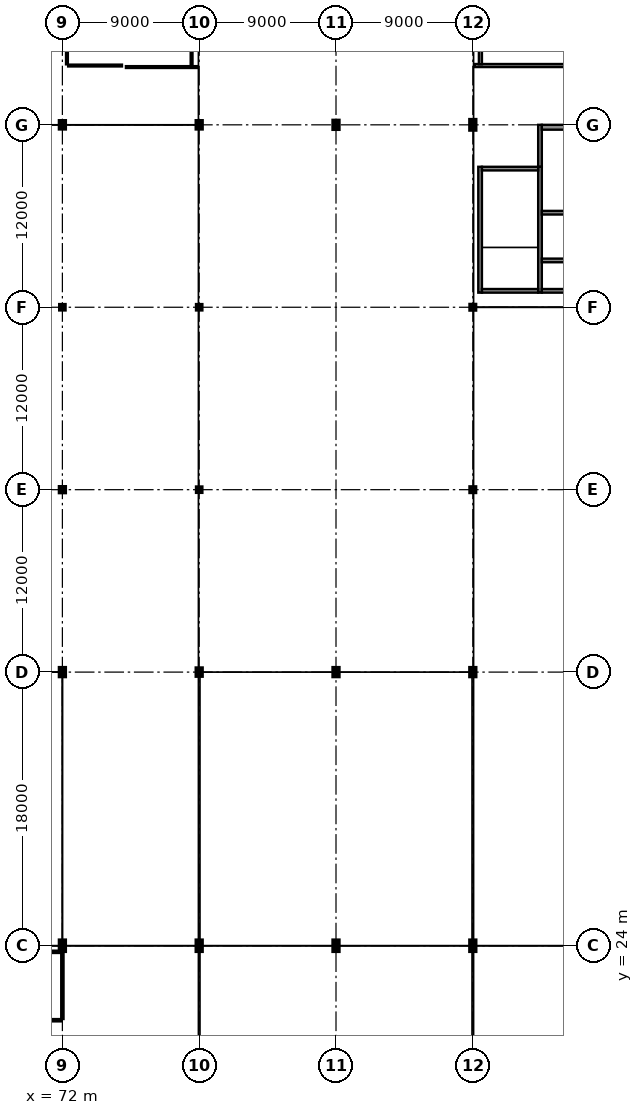
"""IFC4 building model, lengths in metres.
Left out: names, types, materials, properties, quantities, classifications, styles, units other than length and angle.
Written with IfcOpenShell. Run it as: python <this file> out.ifc"""

import sys

from ifc_helpers import new_model, si_unit, direction, frame, frame_2d, origin, origin_2d, place, context, subcontext, project, spatial, rectangle, i_section, extrude, element, fill, save


model = new_model("IFC4")
c1 = context("Model", 3, precision=1e-05, world=origin(), true_north=direction((0.0, 1.0)))
c2 = subcontext(c1, "Body", "Model", "MODEL_VIEW")
j1 = project(units=[si_unit("LENGTHUNIT", "METRE"), si_unit("PLANEANGLEUNIT", "RADIAN")], contexts=[c1])
p1 = place(None, origin())
s1 = spatial("IfcSite", under=j1, at=p1, CompositionType="ELEMENT")
p2 = place(p1, origin())
s2 = spatial("IfcBuilding", under=s1, at=p2, CompositionType="ELEMENT")
p3 = place(p2, frame((0.0, 0.0, 9.9)))
s3 = spatial("IfcBuildingStorey", under=s2, at=p3, CompositionType="ELEMENT", Elevation=9.9)
p4 = place(p3, frame((72.0, 24.0, 0.0), z_axis=(0.0, 0.0, 1.0), x_axis=(1.0, 0.0, 0.0)))
e1 = element("IfcColumn", 1, at=p4, inside=s3, PredefinedType="COLUMN", context=c2, shape_type="SweptSolid", body=[
    extrude(i_section(OverallWidth=0.3, OverallDepth=0.65, WebThickness=0.016, FlangeThickness=0.031, at=origin_2d()), origin(), (0.0, 0.0, 1.0), 4.5),
])
p5 = place(p3, frame((72.0, 42.0, 0.0), z_axis=(0.0, 0.0, 1.0), x_axis=(0.0, 1.0, 0.0)))
e2 = element("IfcColumn", 2, at=p5, inside=s3, PredefinedType="COLUMN", context=c2, shape_type="SweptSolid", body=[
    extrude(i_section(OverallWidth=0.3, OverallDepth=0.5, WebThickness=0.014, FlangeThickness=0.028, at=origin_2d()), origin(), (0.0, 0.0, 1.0), 4.5),
])
p6 = place(p3, frame((72.0, 54.0, 0.0), z_axis=(0.0, 0.0, 1.0), x_axis=(1.0, 0.0, 0.0)))
e3 = element("IfcColumn", 3, at=p6, inside=s3, PredefinedType="COLUMN", context=c2, shape_type="SweptSolid", body=[
    extrude(i_section(OverallWidth=0.3, OverallDepth=0.3, WebThickness=0.011, FlangeThickness=0.019, at=origin_2d()), origin(), (0.0, 0.0, 1.0), 4.5),
])
p7 = place(p3, frame((72.0, 66.0, 0.0), z_axis=(0.0, 0.0, 1.0), x_axis=(1.0, 0.0, 0.0)))
e4 = element("IfcColumn", 4, at=p7, inside=s3, PredefinedType="COLUMN", context=c2, shape_type="SweptSolid", body=[
    extrude(i_section(OverallWidth=0.26, OverallDepth=0.26, WebThickness=0.01, FlangeThickness=0.018, at=origin_2d()), origin(), (0.0, 0.0, 1.0), 4.5),
])
p8 = place(p3, frame((72.0, 78.0, 0.0), z_axis=(0.0, 0.0, 1.0), x_axis=(1.0, 0.0, 0.0)))
e5 = element("IfcColumn", 5, at=p8, inside=s3, PredefinedType="COLUMN", context=c2, shape_type="SweptSolid", body=[
    extrude(i_section(OverallWidth=0.3, OverallDepth=0.45, WebThickness=0.014, FlangeThickness=0.026, at=origin_2d()), origin(), (0.0, 0.0, 1.0), 4.5),
])
p9 = place(p3, frame((81.0, 24.0, 0.0), z_axis=(0.0, 0.0, 1.0), x_axis=(1.0, 0.0, 0.0)))
e6 = element("IfcColumn", 6, at=p9, inside=s3, PredefinedType="COLUMN", context=c2, shape_type="SweptSolid", body=[
    extrude(i_section(OverallWidth=0.3, OverallDepth=0.65, WebThickness=0.016, FlangeThickness=0.031, at=origin_2d()), origin(), (0.0, 0.0, 1.0), 4.5),
])
p10 = place(p3, frame((81.0, 42.0, 0.0), z_axis=(0.0, 0.0, 1.0), x_axis=(1.0, 0.0, 0.0)))
e7 = element("IfcColumn", 7, at=p10, inside=s3, PredefinedType="COLUMN", context=c2, shape_type="SweptSolid", body=[
    extrude(i_section(OverallWidth=0.3, OverallDepth=0.45, WebThickness=0.014, FlangeThickness=0.026, at=origin_2d()), origin(), (0.0, 0.0, 1.0), 4.5),
])
for number, where, z_axis, x_axis in (
    (8, (81.0, 54.0, 0.0), (0.0, 0.0, 1.0), (1.0, 0.0, 0.0)),
    (9, (81.0, 66.0, 0.0), (0.0, 0.0, 1.0), (0.0, 1.0, 0.0)),
):
    element("IfcColumn", number, at=place(p3, frame(where, z_axis=z_axis, x_axis=x_axis)), inside=s3, PredefinedType="COLUMN", context=c2, shape_type="SweptSolid", body=[
        extrude(i_section(OverallWidth=0.26, OverallDepth=0.26, WebThickness=0.01, FlangeThickness=0.018, at=origin_2d()), origin(), (0.0, 0.0, 1.0), 4.5),
    ])
p11 = place(p3, frame((81.0, 78.0, 0.0), z_axis=(0.0, 0.0, 1.0), x_axis=(1.0, 0.0, 0.0)))
e10 = element("IfcColumn", 10, at=p11, inside=s3, PredefinedType="COLUMN", context=c2, shape_type="SweptSolid", body=[
    extrude(i_section(OverallWidth=0.3, OverallDepth=0.45, WebThickness=0.014, FlangeThickness=0.026, at=origin_2d()), origin(), (0.0, 0.0, 1.0), 4.5),
])
p12 = place(p3, frame((90.0, 24.0, 0.0), z_axis=(0.0, 0.0, 1.0), x_axis=(1.0, 0.0, 0.0)))
e11 = element("IfcColumn", 11, at=p12, inside=s3, PredefinedType="COLUMN", context=c2, shape_type="SweptSolid", body=[
    extrude(i_section(OverallWidth=0.3, OverallDepth=0.65, WebThickness=0.016, FlangeThickness=0.031, at=origin_2d()), origin(), (0.0, 0.0, 1.0), 4.5),
])
for number, where, z_axis, x_axis in (
    (12, (90.0, 42.0, 0.0), (0.0, 0.0, 1.0), (1.0, 0.0, 0.0)),
    (13, (90.0, 78.0, 0.0), (0.0, 0.0, 1.0), (1.0, 0.0, 0.0)),
):
    element("IfcColumn", number, at=place(p3, frame(where, z_axis=z_axis, x_axis=x_axis)), inside=s3, PredefinedType="COLUMN", context=c2, shape_type="SweptSolid", body=[
        extrude(i_section(OverallWidth=0.3, OverallDepth=0.5, WebThickness=0.014, FlangeThickness=0.028, at=origin_2d()), origin(), (0.0, 0.0, 1.0), 4.5),
    ])
p13 = place(p3, frame((99.0, 24.0, 0.0), z_axis=(0.0, 0.0, 1.0), x_axis=(0.0, 1.0, 0.0)))
e14 = element("IfcColumn", 14, at=p13, inside=s3, PredefinedType="COLUMN", context=c2, shape_type="SweptSolid", body=[
    extrude(i_section(OverallWidth=0.3, OverallDepth=0.65, WebThickness=0.016, FlangeThickness=0.031, at=origin_2d()), origin(), (0.0, 0.0, 1.0), 4.5),
])
p14 = place(p3, frame((99.0, 42.0, 0.0), z_axis=(0.0, 0.0, 1.0), x_axis=(1.0, 0.0, 0.0)))
e15 = element("IfcColumn", 15, at=p14, inside=s3, PredefinedType="COLUMN", context=c2, shape_type="SweptSolid", body=[
    extrude(i_section(OverallWidth=0.3, OverallDepth=0.5, WebThickness=0.014, FlangeThickness=0.028, at=origin_2d()), origin(), (0.0, 0.0, 1.0), 4.3),
])
p15 = place(p3, frame((99.0, 54.0, 0.0), z_axis=(0.0, 0.0, 1.0), x_axis=(0.0, 1.0, 0.0)))
e16 = element("IfcColumn", 16, at=p15, inside=s3, PredefinedType="COLUMN", context=c2, shape_type="SweptSolid", body=[
    extrude(i_section(OverallWidth=0.28, OverallDepth=0.28, WebThickness=0.01, FlangeThickness=0.018, at=origin_2d()), origin(), (0.0, 0.0, 1.0), 4.3),
])
p16 = place(p3, frame((99.0, 66.0, 0.0), z_axis=(0.0, 0.0, 1.0), x_axis=(1.0, 0.0, 0.0)))
e17 = element("IfcColumn", 17, at=p16, inside=s3, PredefinedType="COLUMN", context=c2, shape_type="SweptSolid", body=[
    extrude(i_section(OverallWidth=0.28, OverallDepth=0.28, WebThickness=0.01, FlangeThickness=0.018, at=origin_2d()), origin(), (0.0, 0.0, 1.0), 4.5),
])
p17 = place(p3, frame((99.0, 78.0, 0.0), z_axis=(0.0, 0.0, 1.0), x_axis=(1.0, 0.0, 0.0)))
e18 = element("IfcColumn", 18, at=p17, inside=s3, PredefinedType="COLUMN", context=c2, shape_type="SweptSolid", body=[
    extrude(i_section(OverallWidth=0.3, OverallDepth=0.6, WebThickness=0.015, FlangeThickness=0.03, at=origin_2d()), origin(), (0.0, 0.0, 1.0), 4.5),
])
p18 = place(p3, frame((99.48, 66.96, 0.0), z_axis=(0.0, 0.0, 1.0), x_axis=(0.0, 1.0, 0.0)))
e19 = element("IfcWall", 19, at=p18, inside=s3, PredefinedType="SHEAR", context=c2, shape_type="SweptSolid", body=[
    extrude(rectangle(XDim=8.28, YDim=0.24, at=frame_2d((4.14, 0.0))), origin(), (0.0, 0.0, 1.0), 4.31),
])
p19 = place(p3, frame((103.42, 66.96, 0.0), z_axis=(0.0, 0.0, 1.0), x_axis=(0.0, 1.0, 0.0)))
e20 = element("IfcWall", 20, at=p19, inside=s3, PredefinedType="SHEAR", context=c2, shape_type="SweptSolid", body=[
    extrude(rectangle(XDim=8.28, YDim=0.24, at=frame_2d((4.14, 0.0))), origin(), (0.0, 0.0, 1.0), 4.31),
])
p20 = place(p19, frame((6.49, 0.0, 0.0)))
e21 = element("IfcOpeningElement", 21, at=p20, cuts=e20, PredefinedType="OPENING", context=c2, shape_type="SweptSolid", body=[
    extrude(rectangle(XDim=1.3, YDim=2.2, at=frame_2d((0.65, 1.1))), frame((0.0, 0.135, 0.0), z_axis=(0.0, -1.0, 0.0), x_axis=(1.0, 0.0, 0.0)), (0.0, 0.0, 1.0), 0.27),
])
for number, where, z_axis, x_axis in (
    (22, (99.6, 67.08, 0.0), (0.0, 0.0, 1.0), (1.0, 0.0, 0.0)),
    (23, (99.6, 75.12, 0.0), (0.0, 0.0, 1.0), (1.0, 0.0, 0.0)),
):
    element("IfcWall", number, at=place(p3, frame(where, z_axis=z_axis, x_axis=x_axis)), inside=s3, PredefinedType="SHEAR", context=c2, shape_type="SweptSolid", body=[
        extrude(rectangle(XDim=3.7, YDim=0.24, at=frame_2d((1.85, 0.0))), origin(), (0.0, 0.0, 1.0), 4.31),
    ])
p21 = place(p3, frame((103.42, 75.24, 0.0), z_axis=(0.0, 0.0, 1.0), x_axis=(0.0, 1.0, 0.0)))
e24 = element("IfcWall", 24, at=p21, inside=s3, PredefinedType="SHEAR", context=c2, shape_type="SweptSolid", body=[
    extrude(rectangle(XDim=2.76, YDim=0.24, at=frame_2d((1.38, 0.0))), origin(), (0.0, 0.0, 1.0), 4.16),
])
p22 = place(p3, frame((103.54, 77.84, 0.0), z_axis=(0.0, 0.0, 1.0), x_axis=(1.0, 0.0, 0.0)))
e25 = element("IfcWall", 25, at=p22, inside=s3, PredefinedType="SHEAR", context=c2, shape_type="SweptSolid", body=[
    extrude(rectangle(XDim=3.9, YDim=0.32, at=frame_2d((1.95, 0.0))), origin(), (0.0, 0.0, 1.0), 4.16),
])
p23 = place(p22, frame((1.225, 0.0, 0.0)))
e26 = element("IfcOpeningElement", 26, at=p23, cuts=e25, PredefinedType="OPENING", context=c2, shape_type="SweptSolid", body=[
    extrude(rectangle(XDim=1.45, YDim=2.2, at=frame_2d((0.725, 1.1))), frame((0.0, 0.175, 0.0), z_axis=(0.0, -1.0, 0.0), x_axis=(1.0, 0.0, 0.0)), (0.0, 0.0, 1.0), 0.35),
])
p24 = place(p3, frame((103.54, 72.22, 0.0), z_axis=(0.0, 0.0, 1.0), x_axis=(1.0, 0.0, 0.0)))
e27 = element("IfcWall", 27, at=p24, inside=s3, PredefinedType="SHEAR", context=c2, shape_type="SweptSolid", body=[
    extrude(rectangle(XDim=3.9, YDim=0.24, at=frame_2d((1.95, 0.0))), origin(), (0.0, 0.0, 1.0), 4.31),
])
p25 = place(p24, frame((0.385, 0.0, 0.0)))
e28 = element("IfcOpeningElement", 28, at=p25, cuts=e27, PredefinedType="OPENING", context=c2, shape_type="SweptSolid", body=[
    extrude(rectangle(XDim=1.3, YDim=2.2, at=frame_2d((0.65, 1.1))), frame((0.0, 0.135, 0.0), z_axis=(0.0, -1.0, 0.0), x_axis=(1.0, 0.0, 0.0)), (0.0, 0.0, 1.0), 0.27),
])
p26 = place(p24, frame((2.335, 0.0, 0.0)))
e29 = element("IfcOpeningElement", 29, at=p26, cuts=e27, PredefinedType="OPENING", context=c2, shape_type="SweptSolid", body=[
    extrude(rectangle(XDim=1.3, YDim=2.2, at=frame_2d((0.65, 1.1))), frame((0.0, 0.135, 0.0), z_axis=(0.0, -1.0, 0.0), x_axis=(1.0, 0.0, 0.0)), (0.0, 0.0, 1.0), 0.27),
])
p27 = place(p3, frame((103.54, 69.08, 0.0), z_axis=(0.0, 0.0, 1.0), x_axis=(1.0, 0.0, 0.0)))
e30 = element("IfcWall", 30, at=p27, inside=s3, PredefinedType="SHEAR", context=c2, shape_type="SweptSolid", body=[
    extrude(rectangle(XDim=3.9, YDim=0.24, at=frame_2d((1.95, 0.0))), origin(), (0.0, 0.0, 1.0), 4.31),
])
p28 = place(p3, frame((103.54, 67.08, 0.0), z_axis=(0.0, 0.0, 1.0), x_axis=(1.0, 0.0, 0.0)))
e31 = element("IfcWall", 31, at=p28, inside=s3, PredefinedType="SHEAR", context=c2, shape_type="SweptSolid", body=[
    extrude(rectangle(XDim=2.26, YDim=0.24, at=frame_2d((1.13, 0.0))), origin(), (0.0, 0.0, 1.0), 4.31),
])
p29 = place(p3, frame((75.92, 81.9, 0.0), z_axis=(0.0, 0.0, 1.0), x_axis=(-1.0, 0.0, 0.0)))
e32 = element("IfcWall", 32, at=p29, inside=s3, PredefinedType="PARTITIONING", context=c2, shape_type="SweptSolid", body=[
    extrude(rectangle(XDim=3.54, YDim=0.12, at=frame_2d((1.77, 0.0))), origin(), (0.0, 0.0, 1.0), 4.14),
])
p30 = place(p29, frame((1.32, 0.0, 0.0)))
e33 = element("IfcOpeningElement", 33, at=p30, cuts=e32, PredefinedType="OPENING", context=c2, shape_type="SweptSolid", body=[
    extrude(rectangle(XDim=0.9, YDim=2.1, at=frame_2d((0.45, 1.05))), frame((0.0, 0.075, 0.0), z_axis=(0.0, -1.0, 0.0), x_axis=(1.0, 0.0, 0.0)), (0.0, 0.0, 1.0), 0.15),
])
p31 = place(p3, frame((72.3, 81.98, 0.0), z_axis=(0.0, 0.0, 1.0), x_axis=(0.0, 1.0, 0.0)))
e34 = element("IfcWall", 34, at=p31, inside=s3, PredefinedType="PARTITIONING", context=c2, shape_type="SweptSolid", body=[
    extrude(rectangle(XDim=25.882, YDim=0.12, at=frame_2d((12.941, 0.0))), origin(), (0.0, 0.0, 1.0), 4.14),
])
p32 = place(p3, frame((80.5, 107.445, 0.0), z_axis=(0.0, 0.0, 1.0), x_axis=(0.0, -1.0, 0.0)))
e35 = element("IfcWall", 35, at=p32, inside=s3, PredefinedType="PARTITIONING", context=c2, shape_type="SweptSolid", body=[
    extrude(rectangle(XDim=25.565, YDim=0.12, at=frame_2d((12.783, 0.0))), origin(), (0.0, 0.0, 1.0), 4.14),
])
p33 = place(p3, frame((80.875, 81.8, 0.0), z_axis=(0.0, 0.0, 1.0), x_axis=(-1.0, 0.0, 0.0)))
e36 = element("IfcWall", 36, at=p33, inside=s3, PredefinedType="PARTITIONING", context=c2, shape_type="SweptSolid", body=[
    extrude(rectangle(XDim=4.695, YDim=0.12, at=frame_2d((2.348, 0.0))), origin(), (0.0, 0.0, 1.0), 4.14),
])
p34 = place(p3, frame((116.72, 81.9, 0.0), z_axis=(0.0, 0.0, 1.0), x_axis=(-1.0, 0.0, 0.0)))
e37 = element("IfcWall", 37, at=p34, inside=s3, PredefinedType="PARTITIONING", context=c2, shape_type="SweptSolid", body=[
    extrude(rectangle(XDim=17.595, YDim=0.2, at=frame_2d((8.797, 0.0))), origin(), (0.0, 0.0, 1.0), 4.14),
])
p35 = place(p34, frame((7.797, 0.0, 0.0)))
e38 = element("IfcOpeningElement", 38, at=p35, cuts=e37, PredefinedType="OPENING", context=c2, shape_type="SweptSolid", body=[
    extrude(rectangle(XDim=2.0, YDim=2.6, at=frame_2d((1.0, 1.3))), frame((0.0, 0.115, 0.0), z_axis=(0.0, -1.0, 0.0), x_axis=(1.0, 0.0, 0.0)), (0.0, 0.0, 1.0), 0.23),
])
p36 = place(p3, frame((99.5, 81.98, 0.0), z_axis=(0.0, 0.0, 1.0), x_axis=(0.0, 1.0, 0.0)))
e39 = element("IfcWall", 39, at=p36, inside=s3, PredefinedType="PARTITIONING", context=c2, shape_type="SweptSolid", body=[
    extrude(rectangle(XDim=13.875, YDim=0.2, at=frame_2d((6.938, 0.0))), origin(), (0.0, 0.0, 1.0), 4.14),
])
p37 = place(p3, frame((32.545, 23.6, 0.0), z_axis=(0.0, 0.0, 1.0), x_axis=(1.0, 0.0, 0.0)))
e40 = element("IfcWall", 40, at=p37, inside=s3, PredefinedType="PARTITIONING", context=c2, shape_type="SweptSolid", body=[
    extrude(rectangle(XDim=39.375, YDim=0.15, at=frame_2d((19.688, 0.0))), origin(), (0.0, 0.0, 1.0), 4.14),
])
p38 = place(p3, frame((72.0, 23.52, 0.0), z_axis=(0.0, 0.0, 1.0), x_axis=(0.0, -1.0, 0.0)))
e41 = element("IfcWall", 41, at=p38, inside=s3, PredefinedType="PARTITIONING", context=c2, shape_type="SweptSolid", body=[
    extrude(rectangle(XDim=4.34, YDim=0.15, at=frame_2d((2.17, 0.0))), origin(), (0.0, 0.0, 1.0), 3.575),
])
p39 = place(p3, frame((71.92, 19.1, 0.0), z_axis=(0.0, 0.0, 1.0), x_axis=(-1.0, 0.0, 0.0)))
e42 = element("IfcWall", 42, at=p39, inside=s3, PredefinedType="PARTITIONING", context=c2, shape_type="SweptSolid", body=[
    extrude(rectangle(XDim=39.375, YDim=0.15, at=frame_2d((19.688, 0.0))), origin(), (0.0, 0.0, 1.0), 4.14),
])
p40 = place(p39, frame((19.163, 0.0, 0.0)))
e43 = element("IfcOpeningElement", 43, at=p40, cuts=e42, PredefinedType="OPENING", context=c2, shape_type="SweptSolid", body=[
    extrude(rectangle(XDim=1.05, YDim=2.25, at=frame_2d((0.525, 1.125))), frame((0.0, 0.09, 0.0), z_axis=(0.0, -1.0, 0.0), x_axis=(1.0, 0.0, 0.0)), (0.0, 0.0, 1.0), 0.18),
])
p41 = place(p20, frame((1.3, 0.0, 0.0), z_axis=(0.0, 0.0, 1.0), x_axis=(-1.0, 0.0, 0.0)))
e44 = element("IfcDoor", 44, at=p41, inside=s3, OperationType="SINGLE_SWING_LEFT", PredefinedType="DOOR", context=c2, shape_type="SweptSolid", body=[
    extrude(rectangle(XDim=1.3, YDim=2.2, at=frame_2d((0.65, 1.1))), frame((0.0, 0.025, 0.0), z_axis=(0.0, -1.0, 0.0), x_axis=(1.0, 0.0, 0.0)), (0.0, 0.0, 1.0), 0.05),
])
fill(e21, e44)
p42 = place(p23, origin())
e45 = element("IfcDoor", 45, at=p42, inside=s3, OperationType="DOUBLE_DOOR_SINGLE_SWING", PredefinedType="DOOR", context=c2, shape_type="SweptSolid", body=[
    extrude(rectangle(XDim=1.45, YDim=2.2, at=frame_2d((0.725, 1.1))), frame((0.0, 0.025, 0.0), z_axis=(0.0, -1.0, 0.0), x_axis=(1.0, 0.0, 0.0)), (0.0, 0.0, 1.0), 0.05),
])
fill(e26, e45)
p43 = place(p25, origin())
e46 = element("IfcDoor", 46, at=p43, inside=s3, OperationType="DOUBLE_DOOR_SLIDING", PredefinedType="DOOR", context=c2, shape_type="SweptSolid", body=[
    extrude(rectangle(XDim=1.3, YDim=2.2, at=frame_2d((0.65, 1.1))), frame((0.0, 0.025, 0.0), z_axis=(0.0, -1.0, 0.0), x_axis=(1.0, 0.0, 0.0)), (0.0, 0.0, 1.0), 0.05),
])
fill(e28, e46)
p44 = place(p30, frame((0.9, 0.0, 0.0), z_axis=(0.0, 0.0, 1.0), x_axis=(-1.0, 0.0, 0.0)))
e47 = element("IfcDoor", 47, at=p44, inside=s3, OperationType="SINGLE_SWING_RIGHT", PredefinedType="DOOR", context=c2, shape_type="SweptSolid", body=[
    extrude(rectangle(XDim=0.9, YDim=2.1, at=frame_2d((0.45, 1.05))), frame((0.0, 0.025, 0.0), z_axis=(0.0, -1.0, 0.0), x_axis=(1.0, 0.0, 0.0)), (0.0, 0.0, 1.0), 0.05),
])
fill(e33, e47)
save(model, sys.argv[1])
